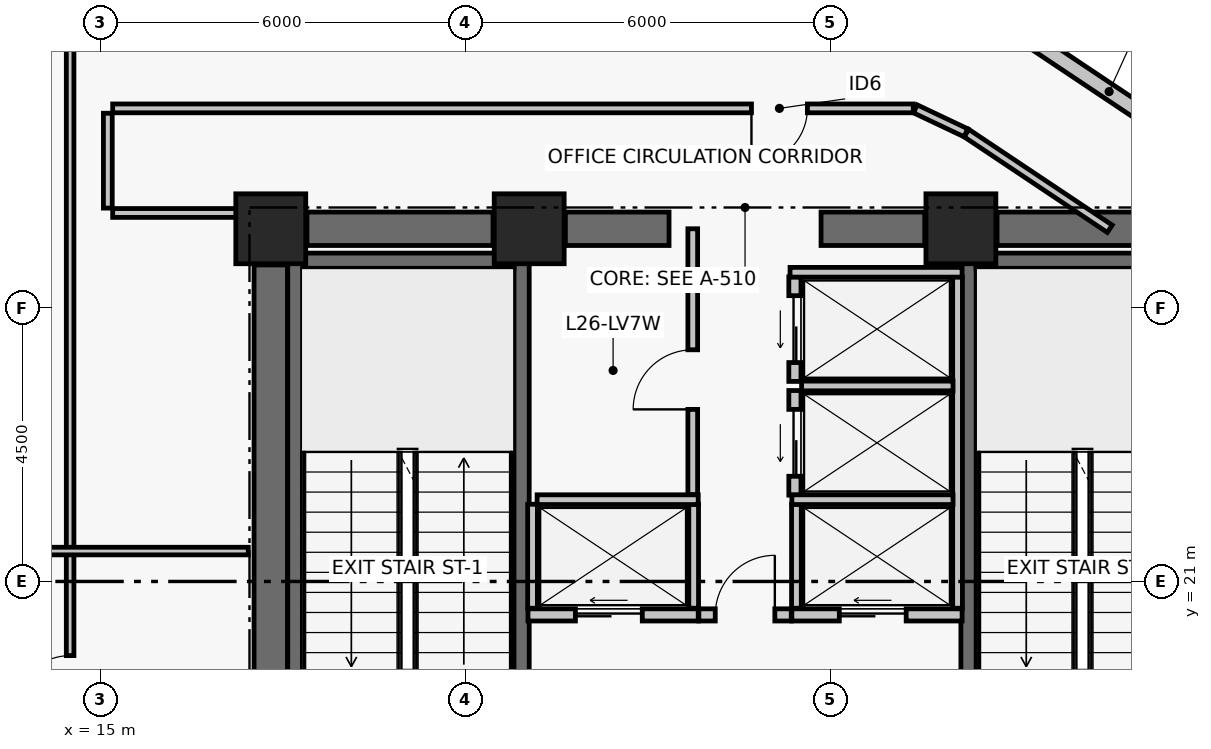
"""IFC4 building model, lengths in metres.
Left out: names, types, materials, properties, quantities, classifications, styles, units other than length and angle.
Written with IfcOpenShell. Run it as: python <this file> out.ifc"""

import sys

from ifc_helpers import new_model, si_unit, direction, frame, frame_2d, origin, origin_2d, place, context, subcontext, project, spatial, rectangle, extrude, element, fill, save


model = new_model("IFC4")
c1 = context("Model", 3, precision=1e-05, world=origin(), true_north=direction((0.0, 1.0)))
c2 = subcontext(c1, "Body", "Model", "MODEL_VIEW")
j1 = project(units=[si_unit("LENGTHUNIT", "METRE"), si_unit("PLANEANGLEUNIT", "RADIAN")], contexts=[c1])
p1 = place(None, origin())
s1 = spatial("IfcSite", under=j1, at=p1, CompositionType="ELEMENT")
p2 = place(p1, origin())
s2 = spatial("IfcBuilding", under=s1, at=p2, CompositionType="ELEMENT")
p3 = place(p2, frame((0.0, 0.0, 107.7)))
s3 = spatial("IfcBuildingStorey", under=s2, at=p3, CompositionType="ELEMENT", Elevation=107.7)
for number, where, z_axis, x_axis in (
    (1, (17.8, 26.8, 0.0), (0.0, 0.0, 1.0), (1.0, 0.0, 0.0)),
    (2, (22.05, 26.8, 0.0), (0.0, 0.0, 1.0), (1.0, 0.0, 0.0)),
    (3, (29.15, 26.8, 0.0), (0.0, 0.0, 1.0), (1.0, 0.0, 0.0)),
):
    element("IfcColumn", number, at=place(p3, frame(where, z_axis=z_axis, x_axis=x_axis)), inside=s3, PredefinedType="COLUMN", context=c2, shape_type="SweptSolid", body=[
        extrude(rectangle(XDim=1.15, YDim=1.15, at=origin_2d()), origin(), (0.0, 0.0, 1.0), 3.72),
    ])
p4 = place(p3, frame((18.395, 26.8, 0.0), z_axis=(0.0, 0.0, 1.0), x_axis=(1.0, 0.0, 0.0)))
e4 = element("IfcWall", 4, at=p4, inside=s3, PredefinedType="SHEAR", context=c2, shape_type="SweptSolid", body=[
    extrude(rectangle(XDim=3.06, YDim=0.55, at=frame_2d((1.53, 0.0))), origin(), (0.0, 0.0, 1.0), 3.47),
])
p5 = place(p3, frame((22.645, 26.8, 0.0), z_axis=(0.0, 0.0, 1.0), x_axis=(1.0, 0.0, 0.0)))
e5 = element("IfcWall", 5, at=p5, inside=s3, PredefinedType="SHEAR", context=c2, shape_type="SweptSolid", body=[
    extrude(rectangle(XDim=1.705, YDim=0.55, at=frame_2d((0.853, 0.0))), origin(), (0.0, 0.0, 1.0), 3.47),
])
p6 = place(p3, frame((26.85, 26.8, 0.0), z_axis=(0.0, 0.0, 1.0), x_axis=(1.0, 0.0, 0.0)))
e6 = element("IfcWall", 6, at=p6, inside=s3, PredefinedType="SHEAR", context=c2, shape_type="SweptSolid", body=[
    extrude(rectangle(XDim=1.705, YDim=0.55, at=frame_2d((0.853, 0.0))), origin(), (0.0, 0.0, 1.0), 3.47),
])
p7 = place(p3, frame((29.745, 26.8, 0.0), z_axis=(0.0, 0.0, 1.0), x_axis=(1.0, 0.0, 0.0)))
e7 = element("IfcWall", 7, at=p7, inside=s3, PredefinedType="SHEAR", context=c2, shape_type="SweptSolid", body=[
    extrude(rectangle(XDim=3.06, YDim=0.55, at=frame_2d((1.53, 0.0))), origin(), (0.0, 0.0, 1.0), 3.47),
])
p8 = place(p3, frame((17.8, 17.795, 0.0), z_axis=(0.0, 0.0, 1.0), x_axis=(0.0, 1.0, 0.0)))
e8 = element("IfcWall", 8, at=p8, inside=s3, PredefinedType="SHEAR", context=c2, shape_type="SweptSolid", body=[
    extrude(rectangle(XDim=8.41, YDim=0.55, at=frame_2d((4.205, 0.0))), origin(), (0.0, 0.0, 1.0), 3.47),
])
p9 = place(p3, frame((18.204, 17.6, 0.0), z_axis=(0.0, 0.0, 1.0), x_axis=(0.0, 1.0, 0.0)))
e9 = element("IfcWall", 9, at=p9, inside=s3, PredefinedType="SHEAR", context=c2, shape_type="SweptSolid", body=[
    extrude(rectangle(XDim=8.8, YDim=0.25, at=frame_2d((4.4, 0.0))), origin(), (0.0, 0.0, 1.0), 3.47),
])
p10 = place(p3, frame((21.925, 17.6, 0.0), z_axis=(0.0, 0.0, 1.0), x_axis=(0.0, 1.0, 0.0)))
e10 = element("IfcWall", 10, at=p10, inside=s3, PredefinedType="SHEAR", context=c2, shape_type="SweptSolid", body=[
    extrude(rectangle(XDim=8.8, YDim=0.25, at=frame_2d((4.4, 0.0))), origin(), (0.0, 0.0, 1.0), 3.47),
])
p11 = place(p10, frame((0.35, 0.0, 0.0)))
e11 = element("IfcOpeningElement", 11, at=p11, cuts=e10, PredefinedType="OPENING", context=c2, shape_type="SweptSolid", body=[
    extrude(rectangle(XDim=1.05, YDim=2.08, at=frame_2d((0.525, 1.04))), frame((0.0, 0.135, 0.0), z_axis=(0.0, -1.0, 0.0), x_axis=(1.0, 0.0, 0.0)), (0.0, 0.0, 1.0), 0.27),
])
p12 = place(p3, frame((18.329, 26.275, 0.0), z_axis=(0.0, 0.0, 1.0), x_axis=(1.0, 0.0, 0.0)))
e12 = element("IfcWall", 12, at=p12, inside=s3, PredefinedType="SHEAR", context=c2, shape_type="SweptSolid", body=[
    extrude(rectangle(XDim=3.471, YDim=0.25, at=frame_2d((1.735, 0.0))), origin(), (0.0, 0.0, 1.0), 3.47),
])
p13 = place(p3, frame((29.275, 17.6, 0.0), z_axis=(0.0, 0.0, 1.0), x_axis=(0.0, 1.0, 0.0)))
e13 = element("IfcWall", 13, at=p13, inside=s3, PredefinedType="SHEAR", context=c2, shape_type="SweptSolid", body=[
    extrude(rectangle(XDim=8.8, YDim=0.25, at=frame_2d((4.4, 0.0))), origin(), (0.0, 0.0, 1.0), 3.47),
])
p14 = place(p13, frame((0.35, 0.0, 0.0)))
e14 = element("IfcOpeningElement", 14, at=p14, cuts=e13, PredefinedType="OPENING", context=c2, shape_type="SweptSolid", body=[
    extrude(rectangle(XDim=1.05, YDim=2.08, at=frame_2d((0.525, 1.04))), frame((0.0, 0.135, 0.0), z_axis=(0.0, -1.0, 0.0), x_axis=(1.0, 0.0, 0.0)), (0.0, 0.0, 1.0), 0.27),
])
p15 = place(p3, frame((29.4, 26.275, 0.0), z_axis=(0.0, 0.0, 1.0), x_axis=(1.0, 0.0, 0.0)))
e15 = element("IfcWall", 15, at=p15, inside=s3, PredefinedType="SHEAR", context=c2, shape_type="SweptSolid", body=[
    extrude(rectangle(XDim=3.471, YDim=0.25, at=frame_2d((1.736, 0.0))), origin(), (0.0, 0.0, 1.0), 3.47),
])
p16 = place(p3, frame((30.07, 30.069, 0.0), z_axis=(0.0, 0.0, 1.0), x_axis=(0.831720838908, -0.555194061681, 0.0)))
e16 = element("IfcWall", 16, at=p16, inside=s3, PredefinedType="PARTITIONING", context=c2, shape_type="SweptSolid", body=[
    extrude(rectangle(XDim=3.65, YDim=0.26, at=frame_2d((1.825, 0.0))), origin(), (0.0, 0.0, 1.0), 2.9),
])
p17 = place(p3, frame((24.84, 20.45, 0.0), z_axis=(0.0, 0.0, 1.0), x_axis=(1.0, 0.0, 0.0)))
e17 = element("IfcWall", 17, at=p17, inside=s3, PredefinedType="PARTITIONING", context=c2, shape_type="SweptSolid", body=[
    extrude(rectangle(XDim=1.52, YDim=0.2, at=frame_2d((0.76, 0.0))), origin(), (0.0, 0.0, 1.0), 3.47),
])
p18 = place(p17, frame((0.27, 0.0, 0.0)))
e18 = element("IfcOpeningElement", 18, at=p18, cuts=e17, PredefinedType="OPENING", context=c2, shape_type="SweptSolid", body=[
    extrude(rectangle(XDim=0.98, YDim=2.06, at=frame_2d((0.49, 1.03))), frame((0.0, 0.11, 0.0), z_axis=(0.0, -1.0, 0.0), x_axis=(1.0, 0.0, 0.0)), (0.0, 0.0, 1.0), 0.22),
])
p19 = place(p3, frame((22.03, 20.45, 0.0), z_axis=(0.0, 0.0, 1.0), x_axis=(1.0, 0.0, 0.0)))
e19 = element("IfcWall", 19, at=p19, inside=s3, PredefinedType="PARTITIONING", context=c2, shape_type="SweptSolid", body=[
    extrude(rectangle(XDim=2.8, YDim=0.2, at=frame_2d((1.4, 0.0))), origin(), (0.0, 0.0, 1.0), 3.47),
])
p20 = place(p19, frame((0.78, 0.0, 0.0)))
e20 = element("IfcOpeningElement", 20, at=p20, cuts=e19, PredefinedType="OPENING", context=c2, shape_type="SweptSolid", body=[
    extrude(rectangle(XDim=1.1, YDim=2.08, at=frame_2d((0.55, 1.04))), frame((0.0, 0.11, 0.0), z_axis=(0.0, -1.0, 0.0), x_axis=(1.0, 0.0, 0.0)), (0.0, 0.0, 1.0), 0.22),
])
p21 = place(p3, frame((26.37, 20.45, 0.0), z_axis=(0.0, 0.0, 1.0), x_axis=(1.0, 0.0, 0.0)))
e21 = element("IfcWall", 21, at=p21, inside=s3, PredefinedType="PARTITIONING", context=c2, shape_type="SweptSolid", body=[
    extrude(rectangle(XDim=2.8, YDim=0.2, at=frame_2d((1.4, 0.0))), origin(), (0.0, 0.0, 1.0), 3.47),
])
p22 = place(p21, frame((0.78, 0.0, 0.0)))
e22 = element("IfcOpeningElement", 22, at=p22, cuts=e21, PredefinedType="OPENING", context=c2, shape_type="SweptSolid", body=[
    extrude(rectangle(XDim=1.1, YDim=2.08, at=frame_2d((0.55, 1.04))), frame((0.0, 0.11, 0.0), z_axis=(0.0, -1.0, 0.0), x_axis=(1.0, 0.0, 0.0)), (0.0, 0.0, 1.0), 0.22),
])
p23 = place(p3, frame((26.42, 22.42, 0.0), z_axis=(0.0, 0.0, 1.0), x_axis=(0.0, 1.0, 0.0)))
e23 = element("IfcWall", 23, at=p23, inside=s3, PredefinedType="PARTITIONING", context=c2, shape_type="SweptSolid", body=[
    extrude(rectangle(XDim=1.72, YDim=0.2, at=frame_2d((0.86, 0.0))), origin(), (0.0, 0.0, 1.0), 3.47),
])
p24 = place(p23, frame((0.31, 0.0, 0.0)))
e24 = element("IfcOpeningElement", 24, at=p24, cuts=e23, PredefinedType="OPENING", context=c2, shape_type="SweptSolid", body=[
    extrude(rectangle(XDim=1.1, YDim=2.08, at=frame_2d((0.55, 1.04))), frame((0.0, 0.11, 0.0), z_axis=(0.0, -1.0, 0.0), x_axis=(1.0, 0.0, 0.0)), (0.0, 0.0, 1.0), 0.22),
])
p25 = place(p3, frame((26.42, 24.29, 0.0), z_axis=(0.0, 0.0, 1.0), x_axis=(0.0, 1.0, 0.0)))
e25 = element("IfcWall", 25, at=p25, inside=s3, PredefinedType="PARTITIONING", context=c2, shape_type="SweptSolid", body=[
    extrude(rectangle(XDim=1.72, YDim=0.2, at=frame_2d((0.86, 0.0))), origin(), (0.0, 0.0, 1.0), 3.47),
])
p26 = place(p25, frame((0.31, 0.0, 0.0)))
e26 = element("IfcOpeningElement", 26, at=p26, cuts=e25, PredefinedType="OPENING", context=c2, shape_type="SweptSolid", body=[
    extrude(rectangle(XDim=1.1, YDim=2.08, at=frame_2d((0.55, 1.04))), frame((0.0, 0.11, 0.0), z_axis=(0.0, -1.0, 0.0), x_axis=(1.0, 0.0, 0.0)), (0.0, 0.0, 1.0), 0.22),
])
for number, where, z_axis, x_axis in (
    (27, (22.105, 20.56, 0.0), (0.0, 0.0, 1.0), (0.0, 1.0, 0.0)),
    (28, (24.755, 20.56, 0.0), (0.0, 0.0, 1.0), (0.0, 1.0, 0.0)),
):
    element("IfcWall", number, at=place(p3, frame(where, z_axis=z_axis, x_axis=x_axis)), inside=s3, PredefinedType="PARTITIONING", context=c2, shape_type="SweptSolid", body=[
        extrude(rectangle(XDim=1.71, YDim=0.16, at=frame_2d((0.855, 0.0))), origin(), (0.0, 0.0, 1.0), 3.47),
    ])
p27 = place(p3, frame((22.18, 22.345, 0.0), z_axis=(0.0, 0.0, 1.0), x_axis=(1.0, 0.0, 0.0)))
e29 = element("IfcWall", 29, at=p27, inside=s3, PredefinedType="PARTITIONING", context=c2, shape_type="SweptSolid", body=[
    extrude(rectangle(XDim=2.65, YDim=0.16, at=frame_2d((1.325, 0.0))), origin(), (0.0, 0.0, 1.0), 3.47),
])
p28 = place(p3, frame((29.095, 20.56, 0.0), z_axis=(0.0, 0.0, 1.0), x_axis=(0.0, 1.0, 0.0)))
e30 = element("IfcWall", 30, at=p28, inside=s3, PredefinedType="PARTITIONING", context=c2, shape_type="SweptSolid", body=[
    extrude(rectangle(XDim=5.45, YDim=0.16, at=frame_2d((2.725, 0.0))), origin(), (0.0, 0.0, 1.0), 3.47),
])
p29 = place(p3, frame((26.445, 20.56, 0.0), z_axis=(0.0, 0.0, 1.0), x_axis=(0.0, 1.0, 0.0)))
e31 = element("IfcWall", 31, at=p29, inside=s3, PredefinedType="PARTITIONING", context=c2, shape_type="SweptSolid", body=[
    extrude(rectangle(XDim=1.71, YDim=0.16, at=frame_2d((0.855, 0.0))), origin(), (0.0, 0.0, 1.0), 3.47),
])
p30 = place(p3, frame((26.37, 22.345, 0.0), z_axis=(0.0, 0.0, 1.0), x_axis=(1.0, 0.0, 0.0)))
e32 = element("IfcWall", 32, at=p30, inside=s3, PredefinedType="PARTITIONING", context=c2, shape_type="SweptSolid", body=[
    extrude(rectangle(XDim=2.65, YDim=0.16, at=frame_2d((1.325, 0.0))), origin(), (0.0, 0.0, 1.0), 3.47),
])
p31 = place(p3, frame((26.53, 24.215, 0.0), z_axis=(0.0, 0.0, 1.0), x_axis=(1.0, 0.0, 0.0)))
e33 = element("IfcWall", 33, at=p31, inside=s3, PredefinedType="PARTITIONING", context=c2, shape_type="SweptSolid", body=[
    extrude(rectangle(XDim=2.49, YDim=0.16, at=frame_2d((1.245, 0.0))), origin(), (0.0, 0.0, 1.0), 3.47),
])
p32 = place(p3, frame((26.34, 26.085, 0.0), z_axis=(0.0, 0.0, 1.0), x_axis=(1.0, 0.0, 0.0)))
e34 = element("IfcWall", 34, at=p32, inside=s3, PredefinedType="PARTITIONING", context=c2, shape_type="SweptSolid", body=[
    extrude(rectangle(XDim=2.83, YDim=0.16, at=frame_2d((1.415, 0.0))), origin(), (0.0, 0.0, 1.0), 3.47),
])
p33 = place(p3, frame((24.74, 22.43, 0.0), z_axis=(0.0, 0.0, 1.0), x_axis=(0.0, 1.0, 0.0)))
e35 = element("IfcWall", 35, at=p33, inside=s3, PredefinedType="PARTITIONING", context=c2, shape_type="SweptSolid", body=[
    extrude(rectangle(XDim=4.37, YDim=0.16, at=frame_2d((2.185, 0.0))), origin(), (0.0, 0.0, 1.0), 2.6),
])
p34 = place(p33, frame((1.4, 0.0, 0.0)))
e36 = element("IfcOpeningElement", 36, at=p34, cuts=e35, PredefinedType="OPENING", context=c2, shape_type="SweptSolid", body=[
    extrude(rectangle(XDim=0.98, YDim=2.06, at=frame_2d((0.49, 1.03))), frame((0.0, 0.09, 0.0), z_axis=(0.0, -1.0, 0.0), x_axis=(1.0, 0.0, 0.0)), (0.0, 0.0, 1.0), 0.18),
])
p35 = place(p3, frame((31.598, 26.8, 0.0), z_axis=(0.0, 0.0, 1.0), x_axis=(-0.831758510993, 0.555137622028, 0.0)))
e37 = element("IfcWall", 37, at=p35, inside=s3, PredefinedType="PARTITIONING", context=c2, shape_type="SweptSolid", body=[
    extrude(rectangle(XDim=2.833, YDim=0.145, at=frame_2d((1.417, 0.0))), origin(), (0.0, 0.0, 1.0), 2.6),
])
p36 = place(p3, frame((29.232, 28.379, 0.0), z_axis=(0.0, 0.0, 1.0), x_axis=(-0.903829701814, 0.427892358098, 0.0)))
e38 = element("IfcWall", 38, at=p36, inside=s3, PredefinedType="PARTITIONING", context=c2, shape_type="SweptSolid", body=[
    extrude(rectangle(XDim=0.92, YDim=0.145, at=frame_2d((0.46, 0.0))), origin(), (0.0, 0.0, 1.0), 3.47),
])
p37 = place(p3, frame((28.366, 28.78, 0.0), z_axis=(0.0, 0.0, 1.0), x_axis=(-1.0, 0.0, 0.0)))
e39 = element("IfcWall", 39, at=p37, inside=s3, PredefinedType="PARTITIONING", context=c2, shape_type="SweptSolid", body=[
    extrude(rectangle(XDim=13.166, YDim=0.145, at=frame_2d((6.583, 0.0))), origin(), (0.0, 0.0, 1.0), 2.65),
])
p38 = place(p37, frame((1.741, 0.0, 0.0)))
e40 = element("IfcOpeningElement", 40, at=p38, cuts=e39, PredefinedType="OPENING", context=c2, shape_type="SweptSolid", body=[
    extrude(rectangle(XDim=0.92, YDim=2.05, at=frame_2d((0.46, 1.025))), frame((0.0, 0.083, 0.0), z_axis=(0.0, -1.0, 0.0), x_axis=(1.0, 0.0, 0.0)), (0.0, 0.0, 1.0), 0.165),
])
p39 = place(p3, frame((15.12, 28.7, 0.0), z_axis=(0.0, 0.0, 1.0), x_axis=(0.0, -1.0, 0.0)))
e41 = element("IfcWall", 41, at=p39, inside=s3, PredefinedType="PARTITIONING", context=c2, shape_type="SweptSolid", body=[
    extrude(rectangle(XDim=1.56, YDim=0.145, at=frame_2d((0.78, 0.0))), origin(), (0.0, 0.0, 1.0), 2.65),
])
p40 = place(p3, frame((15.2, 27.06, 0.0), z_axis=(0.0, 0.0, 1.0), x_axis=(1.0, 0.0, 0.0)))
e42 = element("IfcWall", 42, at=p40, inside=s3, PredefinedType="PARTITIONING", context=c2, shape_type="SweptSolid", body=[
    extrude(rectangle(XDim=2.18, YDim=0.145, at=frame_2d((1.09, 0.0))), origin(), (0.0, 0.0, 1.0), 2.65),
])
p41 = place(p3, frame((14.5, 7.535, 0.0), z_axis=(0.0, 0.0, 1.0), x_axis=(0.0, 1.0, 0.0)))
e43 = element("IfcWall", 43, at=p41, inside=s3, PredefinedType="PARTITIONING", context=c2, shape_type="SweptSolid", body=[
    extrude(rectangle(XDim=28.648, YDim=0.125, at=frame_2d((14.324, 0.0))), origin(), (0.0, 0.0, 1.0), 2.2),
])
p42 = place(p41, frame((11.325, 0.0, 0.0)))
e44 = element("IfcOpeningElement", 44, at=p42, cuts=e43, PredefinedType="OPENING", context=c2, shape_type="SweptSolid", body=[
    extrude(rectangle(XDim=0.92, YDim=2.05, at=frame_2d((0.46, 1.025))), frame((0.0, 0.073, 0.0), z_axis=(0.0, -1.0, 0.0), x_axis=(1.0, 0.0, 0.0)), (0.0, 0.0, 1.0), 0.145),
])
p43 = place(p3, frame((3.128, 21.5, 0.0), z_axis=(0.0, 0.0, 1.0), x_axis=(1.0, 0.0, 0.0)))
e45 = element("IfcWall", 45, at=p43, inside=s3, PredefinedType="PARTITIONING", context=c2, shape_type="SweptSolid", body=[
    extrude(rectangle(XDim=14.302, YDim=0.125, at=frame_2d((7.151, 0.0))), origin(), (0.0, 0.0, 1.0), 2.6),
])
p44 = place(p43, frame((0.28, 0.0, 0.0)))
e46 = element("IfcOpeningElement", 46, at=p44, cuts=e45, PredefinedType="OPENING", context=c2, shape_type="SweptSolid", body=[
    extrude(rectangle(XDim=0.92, YDim=2.05, at=frame_2d((0.46, 1.025))), frame((0.0, 0.073, 0.0), z_axis=(0.0, -1.0, 0.0), x_axis=(1.0, 0.0, 0.0)), (0.0, 0.0, 1.0), 0.145),
])
p45 = place(p18, origin())
e47 = element("IfcDoor", 47, at=p45, inside=s3, OperationType="SINGLE_SWING_RIGHT", PredefinedType="DOOR", context=c2, shape_type="SweptSolid", body=[
    extrude(rectangle(XDim=0.98, YDim=2.06, at=frame_2d((0.49, 1.03))), frame((0.0, 0.025, 0.0), z_axis=(0.0, -1.0, 0.0), x_axis=(1.0, 0.0, 0.0)), (0.0, 0.0, 1.0), 0.05),
])
fill(e18, e47)
p46 = place(p20, origin())
e48 = element("IfcDoor", 48, at=p46, inside=s3, OperationType="DOUBLE_DOOR_SLIDING", PredefinedType="DOOR", context=c2, shape_type="SweptSolid", body=[
    extrude(rectangle(XDim=1.1, YDim=2.08, at=frame_2d((0.55, 1.04))), frame((0.0, 0.025, 0.0), z_axis=(0.0, -1.0, 0.0), x_axis=(1.0, 0.0, 0.0)), (0.0, 0.0, 1.0), 0.05),
])
fill(e20, e48)
p47 = place(p22, origin())
e49 = element("IfcDoor", 49, at=p47, inside=s3, OperationType="DOUBLE_DOOR_SLIDING", PredefinedType="DOOR", context=c2, shape_type="SweptSolid", body=[
    extrude(rectangle(XDim=1.1, YDim=2.08, at=frame_2d((0.55, 1.04))), frame((0.0, 0.025, 0.0), z_axis=(0.0, -1.0, 0.0), x_axis=(1.0, 0.0, 0.0)), (0.0, 0.0, 1.0), 0.05),
])
fill(e22, e49)
p48 = place(p24, origin())
e50 = element("IfcDoor", 50, at=p48, inside=s3, OperationType="DOUBLE_DOOR_SLIDING", PredefinedType="DOOR", context=c2, shape_type="SweptSolid", body=[
    extrude(rectangle(XDim=1.1, YDim=2.08, at=frame_2d((0.55, 1.04))), frame((0.0, 0.025, 0.0), z_axis=(0.0, -1.0, 0.0), x_axis=(1.0, 0.0, 0.0)), (0.0, 0.0, 1.0), 0.05),
])
fill(e24, e50)
p49 = place(p26, origin())
e51 = element("IfcDoor", 51, at=p49, inside=s3, OperationType="DOUBLE_DOOR_SLIDING", PredefinedType="DOOR", context=c2, shape_type="SweptSolid", body=[
    extrude(rectangle(XDim=1.1, YDim=2.08, at=frame_2d((0.55, 1.04))), frame((0.0, 0.025, 0.0), z_axis=(0.0, -1.0, 0.0), x_axis=(1.0, 0.0, 0.0)), (0.0, 0.0, 1.0), 0.05),
])
fill(e26, e51)
p50 = place(p34, origin())
e52 = element("IfcDoor", 52, at=p50, inside=s3, OperationType="SINGLE_SWING_LEFT", PredefinedType="DOOR", context=c2, shape_type="SweptSolid", body=[
    extrude(rectangle(XDim=0.98, YDim=2.06, at=frame_2d((0.49, 1.03))), frame((0.0, 0.025, 0.0), z_axis=(0.0, -1.0, 0.0), x_axis=(1.0, 0.0, 0.0)), (0.0, 0.0, 1.0), 0.05),
])
fill(e36, e52)
p51 = place(p38, origin())
e53 = element("IfcDoor", 53, at=p51, inside=s3, OperationType="SINGLE_SWING_RIGHT", PredefinedType="DOOR", context=c2, shape_type="SweptSolid", body=[
    extrude(rectangle(XDim=0.92, YDim=2.05, at=frame_2d((0.46, 1.025))), frame((0.0, 0.025, 0.0), z_axis=(0.0, -1.0, 0.0), x_axis=(1.0, 0.0, 0.0)), (0.0, 0.0, 1.0), 0.05),
])
fill(e40, e53)
p52 = place(p42, origin())
e54 = element("IfcDoor", 54, at=p52, inside=s3, OperationType="SINGLE_SWING_LEFT", PredefinedType="DOOR", context=c2, shape_type="SweptSolid", body=[
    extrude(rectangle(XDim=0.92, YDim=2.05, at=frame_2d((0.46, 1.025))), frame((0.0, 0.025, 0.0), z_axis=(0.0, -1.0, 0.0), x_axis=(1.0, 0.0, 0.0)), (0.0, 0.0, 1.0), 0.05),
])
fill(e44, e54)
save(model, sys.argv[1])
